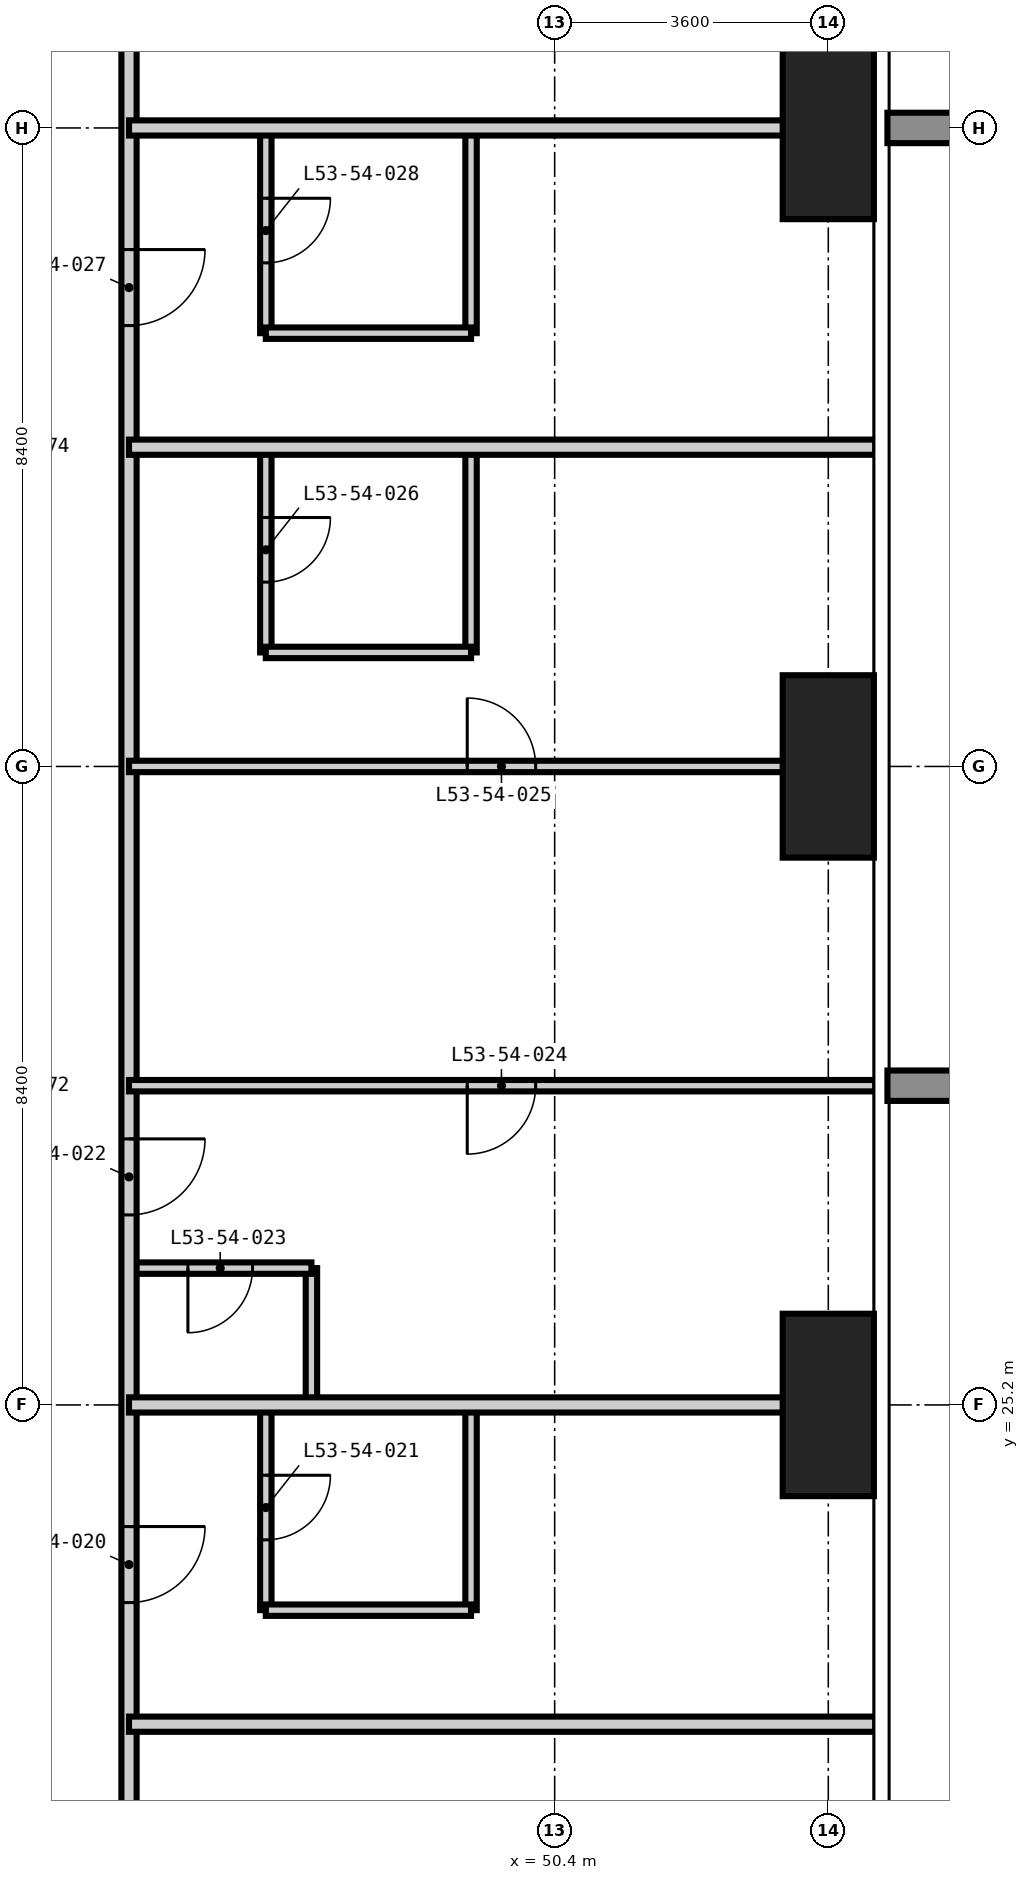
"""IFC4 building model, lengths in metres.
Left out: names, types, materials, properties, quantities, classifications, styles, units other than length and angle.
Written with IfcOpenShell. Run it as: python <this file> out.ifc"""

import sys

from ifc_helpers import new_model, si_unit, direction, frame, frame_2d, origin, origin_2d, place, context, subcontext, project, spatial, rectangle, extrude, element, fill, save


model = new_model("IFC4")
c1 = context("Model", 3, precision=1e-05, world=origin(), true_north=direction((0.0, 1.0)))
c2 = subcontext(c1, "Body", "Model", "MODEL_VIEW")
j1 = project(units=[si_unit("LENGTHUNIT", "METRE"), si_unit("PLANEANGLEUNIT", "RADIAN")], contexts=[c1])
p1 = place(None, origin())
s1 = spatial("IfcSite", under=j1, at=p1, CompositionType="ELEMENT")
p2 = place(p1, origin())
s2 = spatial("IfcBuilding", under=s1, at=p2, CompositionType="ELEMENT")
p3 = place(p2, frame((0.0, 0.0, 205.8)))
s3 = spatial("IfcBuildingStorey", under=s2, at=p3, CompositionType="ELEMENT", Elevation=205.8)
for number, where, z_axis, x_axis in (
    (1, (54.0, 25.2, -0.35), (0.0, 0.0, 1.0), (1.0, 0.0, 0.0)),
    (2, (54.0, 33.6, -0.35), (0.0, 0.0, 1.0), (1.0, 0.0, 0.0)),
    (3, (54.0, 42.0, -0.35), (0.0, 0.0, 1.0), (1.0, 0.0, 0.0)),
):
    element("IfcColumn", number, at=place(p3, frame(where, z_axis=z_axis, x_axis=x_axis)), inside=s3, PredefinedType="COLUMN", context=c2, shape_type="SweptSolid", body=[
        extrude(rectangle(XDim=1.2, YDim=2.4, at=origin_2d()), origin(), (0.0, 0.0, 1.0), 3.6),
    ])
p4 = place(p3, frame((46.6, 22.5, 0.0), z_axis=(0.0, 0.0, 1.0), x_axis=(0.0, 1.0, 0.0)))
e4 = element("IfcWall", 4, at=p4, inside=s3, PredefinedType="PARTITIONING", context=c2, shape_type="SweptSolid", body=[
    extrude(rectangle(XDim=2.7, YDim=0.15, at=frame_2d((1.35, 0.0))), origin(), (0.0, 0.0, 1.0), 3.25),
])
p5 = place(p4, frame((0.925, 0.0, 0.0)))
e5 = element("IfcOpeningElement", 5, at=p5, cuts=e4, PredefinedType="OPENING", context=c2, shape_type="SweptSolid", body=[
    extrude(rectangle(XDim=0.85, YDim=2.1, at=frame_2d((0.425, 1.05))), frame((0.0, 0.085, 0.0), z_axis=(0.0, -1.0, 0.0), x_axis=(1.0, 0.0, 0.0)), (0.0, 0.0, 1.0), 0.17),
])
p6 = place(p3, frame((46.6, 35.1, 0.0), z_axis=(0.0, 0.0, 1.0), x_axis=(0.0, 1.0, 0.0)))
e6 = element("IfcWall", 6, at=p6, inside=s3, PredefinedType="PARTITIONING", context=c2, shape_type="SweptSolid", body=[
    extrude(rectangle(XDim=2.7, YDim=0.15, at=frame_2d((1.35, 0.0))), origin(), (0.0, 0.0, 1.0), 3.25),
])
p7 = place(p6, frame((0.925, 0.0, 0.0)))
e7 = element("IfcOpeningElement", 7, at=p7, cuts=e6, PredefinedType="OPENING", context=c2, shape_type="SweptSolid", body=[
    extrude(rectangle(XDim=0.85, YDim=2.1, at=frame_2d((0.425, 1.05))), frame((0.0, 0.085, 0.0), z_axis=(0.0, -1.0, 0.0), x_axis=(1.0, 0.0, 0.0)), (0.0, 0.0, 1.0), 0.17),
])
p8 = place(p3, frame((46.6, 39.3, 0.0), z_axis=(0.0, 0.0, 1.0), x_axis=(0.0, 1.0, 0.0)))
e8 = element("IfcWall", 8, at=p8, inside=s3, PredefinedType="PARTITIONING", context=c2, shape_type="SweptSolid", body=[
    extrude(rectangle(XDim=2.7, YDim=0.15, at=frame_2d((1.35, 0.0))), origin(), (0.0, 0.0, 1.0), 3.25),
])
p9 = place(p8, frame((0.925, 0.0, 0.0)))
e9 = element("IfcOpeningElement", 9, at=p9, cuts=e8, PredefinedType="OPENING", context=c2, shape_type="SweptSolid", body=[
    extrude(rectangle(XDim=0.85, YDim=2.1, at=frame_2d((0.425, 1.05))), frame((0.0, 0.085, 0.0), z_axis=(0.0, -1.0, 0.0), x_axis=(1.0, 0.0, 0.0)), (0.0, 0.0, 1.0), 0.17),
])
p10 = place(p3, frame((47.2, 25.2, 0.0), z_axis=(0.0, 0.0, 1.0), x_axis=(0.0, 1.0, 0.0)))
e10 = element("IfcWall", 10, at=p10, inside=s3, PredefinedType="PARTITIONING", context=c2, shape_type="SweptSolid", body=[
    extrude(rectangle(XDim=1.8, YDim=0.15, at=frame_2d((0.9, 0.0))), origin(), (0.0, 0.0, 1.0), 3.25),
])
for number, where, z_axis, x_axis in (
    (11, (49.3, 22.5, 0.0), (0.0, 0.0, 1.0), (0.0, 1.0, 0.0)),
    (12, (49.3, 35.1, 0.0), (0.0, 0.0, 1.0), (0.0, 1.0, 0.0)),
    (13, (49.3, 39.3, 0.0), (0.0, 0.0, 1.0), (0.0, 1.0, 0.0)),
    (14, (46.6, 22.5, 0.0), (0.0, 0.0, 1.0), (1.0, 0.0, 0.0)),
):
    element("IfcWall", number, at=place(p3, frame(where, z_axis=z_axis, x_axis=x_axis)), inside=s3, PredefinedType="PARTITIONING", context=c2, shape_type="SweptSolid", body=[
        extrude(rectangle(XDim=2.7, YDim=0.15, at=frame_2d((1.35, 0.0))), origin(), (0.0, 0.0, 1.0), 3.25),
    ])
p11 = place(p3, frame((44.8, 27.0, 0.0), z_axis=(0.0, 0.0, 1.0), x_axis=(1.0, 0.0, 0.0)))
e15 = element("IfcWall", 15, at=p11, inside=s3, PredefinedType="PARTITIONING", context=c2, shape_type="SweptSolid", body=[
    extrude(rectangle(XDim=2.4, YDim=0.15, at=frame_2d((1.2, 0.0))), origin(), (0.0, 0.0, 1.0), 3.25),
])
p12 = place(p11, frame((0.775, 0.0, 0.0)))
e16 = element("IfcOpeningElement", 16, at=p12, cuts=e15, PredefinedType="OPENING", context=c2, shape_type="SweptSolid", body=[
    extrude(rectangle(XDim=0.85, YDim=2.1, at=frame_2d((0.425, 1.05))), frame((0.0, 0.085, 0.0), z_axis=(0.0, -1.0, 0.0), x_axis=(1.0, 0.0, 0.0)), (0.0, 0.0, 1.0), 0.17),
])
for number, where, z_axis, x_axis in (
    (17, (46.6, 35.1, 0.0), (0.0, 0.0, 1.0), (1.0, 0.0, 0.0)),
    (18, (46.6, 39.3, 0.0), (0.0, 0.0, 1.0), (1.0, 0.0, 0.0)),
):
    element("IfcWall", number, at=place(p3, frame(where, z_axis=z_axis, x_axis=x_axis)), inside=s3, PredefinedType="PARTITIONING", context=c2, shape_type="SweptSolid", body=[
        extrude(rectangle(XDim=2.7, YDim=0.15, at=frame_2d((1.35, 0.0))), origin(), (0.0, 0.0, 1.0), 3.25),
    ])
p13 = place(p3, frame((44.8, 45.4, 0.0), z_axis=(0.0, 0.0, 1.0), x_axis=(0.0, -1.0, 0.0)))
e19 = element("IfcWall", 19, at=p13, inside=s3, PredefinedType="PARTITIONING", context=c2, shape_type="SweptSolid", body=[
    extrude(rectangle(XDim=30.8, YDim=0.2, at=frame_2d((15.4, 0.0))), origin(), (0.0, 0.0, 1.0), 3.25),
])
p14 = place(p13, frame((26.0, 0.0, 0.0)))
e20 = element("IfcOpeningElement", 20, at=p14, cuts=e19, PredefinedType="OPENING", context=c2, shape_type="SweptSolid", body=[
    extrude(rectangle(XDim=1.0, YDim=2.2, at=frame_2d((0.5, 1.1))), frame((0.0, 0.11, 0.0), z_axis=(0.0, -1.0, 0.0), x_axis=(1.0, 0.0, 0.0)), (0.0, 0.0, 1.0), 0.22),
])
p15 = place(p13, frame((21.8, 0.0, 0.0)))
e21 = element("IfcOpeningElement", 21, at=p15, cuts=e19, PredefinedType="OPENING", context=c2, shape_type="SweptSolid", body=[
    extrude(rectangle(XDim=1.0, YDim=2.2, at=frame_2d((0.5, 1.1))), frame((0.0, 0.11, 0.0), z_axis=(0.0, -1.0, 0.0), x_axis=(1.0, 0.0, 0.0)), (0.0, 0.0, 1.0), 0.22),
])
p16 = place(p13, frame((16.7, 0.0, 0.0)))
e22 = element("IfcOpeningElement", 22, at=p16, cuts=e19, PredefinedType="OPENING", context=c2, shape_type="SweptSolid", body=[
    extrude(rectangle(XDim=1.0, YDim=2.2, at=frame_2d((0.5, 1.1))), frame((0.0, 0.11, 0.0), z_axis=(0.0, -1.0, 0.0), x_axis=(1.0, 0.0, 0.0)), (0.0, 0.0, 1.0), 0.22),
])
p17 = place(p13, frame((5.0, 0.0, 0.0)))
e23 = element("IfcOpeningElement", 23, at=p17, cuts=e19, PredefinedType="OPENING", context=c2, shape_type="SweptSolid", body=[
    extrude(rectangle(XDim=1.0, YDim=2.2, at=frame_2d((0.5, 1.1))), frame((0.0, 0.11, 0.0), z_axis=(0.0, -1.0, 0.0), x_axis=(1.0, 0.0, 0.0)), (0.0, 0.0, 1.0), 0.22),
])
p18 = place(p13, frame((29.2, 0.0, 0.0)))
e24 = element("IfcOpeningElement", 24, at=p18, cuts=e19, PredefinedType="OPENING", context=c2, shape_type="SweptSolid", body=[
    extrude(rectangle(XDim=1.0, YDim=2.2, at=frame_2d((0.5, 1.1))), frame((0.0, 0.11, 0.0), z_axis=(0.0, -1.0, 0.0), x_axis=(1.0, 0.0, 0.0)), (0.0, 0.0, 1.0), 0.22),
])
p19 = place(p13, frame((1.2, 0.0, 0.0)))
e25 = element("IfcOpeningElement", 25, at=p19, cuts=e19, PredefinedType="OPENING", context=c2, shape_type="SweptSolid", body=[
    extrude(rectangle(XDim=1.0, YDim=2.2, at=frame_2d((0.5, 1.1))), frame((0.0, 0.11, 0.0), z_axis=(0.0, -1.0, 0.0), x_axis=(1.0, 0.0, 0.0)), (0.0, 0.0, 1.0), 0.22),
])
for number, where, z_axis, x_axis in (
    (26, (44.8, 21.0, 0.0), (0.0, 0.0, 1.0), (1.0, 0.0, 0.0)),
    (27, (44.8, 25.2, 0.0), (0.0, 0.0, 1.0), (1.0, 0.0, 0.0)),
    (28, (44.8, 37.8, 0.0), (0.0, 0.0, 1.0), (1.0, 0.0, 0.0)),
    (29, (44.8, 42.0, 0.0), (0.0, 0.0, 1.0), (1.0, 0.0, 0.0)),
):
    element("IfcWall", number, at=place(p3, frame(where, z_axis=z_axis, x_axis=x_axis)), inside=s3, PredefinedType="PARTITIONING", context=c2, shape_type="SweptSolid", body=[
        extrude(rectangle(XDim=9.818, YDim=0.2, at=frame_2d((4.909, 0.0))), origin(), (0.0, 0.0, 1.0), 3.25),
    ])
p20 = place(p3, frame((44.8, 29.4, 0.0), z_axis=(0.0, 0.0, 1.0), x_axis=(1.0, 0.0, 0.0)))
e30 = element("IfcWall", 30, at=p20, inside=s3, PredefinedType="PARTITIONING", context=c2, shape_type="SweptSolid", body=[
    extrude(rectangle(XDim=9.818, YDim=0.15, at=frame_2d((4.909, 0.0))), origin(), (0.0, 0.0, 1.0), 3.25),
])
p21 = place(p20, frame((4.45, 0.0, 0.0)))
e31 = element("IfcOpeningElement", 31, at=p21, cuts=e30, PredefinedType="OPENING", context=c2, shape_type="SweptSolid", body=[
    extrude(rectangle(XDim=0.9, YDim=2.1, at=frame_2d((0.45, 1.05))), frame((0.0, 0.085, 0.0), z_axis=(0.0, -1.0, 0.0), x_axis=(1.0, 0.0, 0.0)), (0.0, 0.0, 1.0), 0.17),
])
p22 = place(p3, frame((44.8, 33.6, 0.0), z_axis=(0.0, 0.0, 1.0), x_axis=(1.0, 0.0, 0.0)))
e32 = element("IfcWall", 32, at=p22, inside=s3, PredefinedType="PARTITIONING", context=c2, shape_type="SweptSolid", body=[
    extrude(rectangle(XDim=9.818, YDim=0.15, at=frame_2d((4.909, 0.0))), origin(), (0.0, 0.0, 1.0), 3.25),
])
p23 = place(p22, frame((4.45, 0.0, 0.0)))
e33 = element("IfcOpeningElement", 33, at=p23, cuts=e32, PredefinedType="OPENING", context=c2, shape_type="SweptSolid", body=[
    extrude(rectangle(XDim=0.9, YDim=2.1, at=frame_2d((0.45, 1.05))), frame((0.0, 0.085, 0.0), z_axis=(0.0, -1.0, 0.0), x_axis=(1.0, 0.0, 0.0)), (0.0, 0.0, 1.0), 0.17),
])
p24 = place(p15, origin())
e34 = element("IfcDoor", 34, at=p24, inside=s3, OperationType="SINGLE_SWING_LEFT", PredefinedType="DOOR", context=c2, shape_type="SweptSolid", body=[
    extrude(rectangle(XDim=1.0, YDim=2.2, at=frame_2d((0.5, 1.1))), frame((0.0, 0.025, 0.0), z_axis=(0.0, -1.0, 0.0), x_axis=(1.0, 0.0, 0.0)), (0.0, 0.0, 1.0), 0.05),
])
fill(e21, e34)
p25 = place(p5, frame((0.85, 0.0, 0.0), z_axis=(0.0, 0.0, 1.0), x_axis=(-1.0, 0.0, 0.0)))
e35 = element("IfcDoor", 35, at=p25, inside=s3, OperationType="SINGLE_SWING_LEFT", PredefinedType="DOOR", context=c2, shape_type="SweptSolid", body=[
    extrude(rectangle(XDim=0.85, YDim=2.1, at=frame_2d((0.425, 1.05))), frame((0.0, 0.025, 0.0), z_axis=(0.0, -1.0, 0.0), x_axis=(1.0, 0.0, 0.0)), (0.0, 0.0, 1.0), 0.05),
])
fill(e5, e35)
p26 = place(p16, origin())
e36 = element("IfcDoor", 36, at=p26, inside=s3, OperationType="SINGLE_SWING_LEFT", PredefinedType="DOOR", context=c2, shape_type="SweptSolid", body=[
    extrude(rectangle(XDim=1.0, YDim=2.2, at=frame_2d((0.5, 1.1))), frame((0.0, 0.025, 0.0), z_axis=(0.0, -1.0, 0.0), x_axis=(1.0, 0.0, 0.0)), (0.0, 0.0, 1.0), 0.05),
])
fill(e22, e36)
p27 = place(p12, frame((0.85, 0.0, 0.0), z_axis=(0.0, 0.0, 1.0), x_axis=(-1.0, 0.0, 0.0)))
e37 = element("IfcDoor", 37, at=p27, inside=s3, OperationType="SINGLE_SWING_RIGHT", PredefinedType="DOOR", context=c2, shape_type="SweptSolid", body=[
    extrude(rectangle(XDim=0.85, YDim=2.1, at=frame_2d((0.425, 1.05))), frame((0.0, 0.025, 0.0), z_axis=(0.0, -1.0, 0.0), x_axis=(1.0, 0.0, 0.0)), (0.0, 0.0, 1.0), 0.05),
])
fill(e16, e37)
p28 = place(p21, frame((0.9, 0.0, 0.0), z_axis=(0.0, 0.0, 1.0), x_axis=(-1.0, 0.0, 0.0)))
e38 = element("IfcDoor", 38, at=p28, inside=s3, OperationType="SINGLE_SWING_RIGHT", PredefinedType="DOOR", context=c2, shape_type="SweptSolid", body=[
    extrude(rectangle(XDim=0.9, YDim=2.1, at=frame_2d((0.45, 1.05))), frame((0.0, 0.025, 0.0), z_axis=(0.0, -1.0, 0.0), x_axis=(1.0, 0.0, 0.0)), (0.0, 0.0, 1.0), 0.05),
])
fill(e31, e38)
p29 = place(p23, origin())
e39 = element("IfcDoor", 39, at=p29, inside=s3, OperationType="SINGLE_SWING_LEFT", PredefinedType="DOOR", context=c2, shape_type="SweptSolid", body=[
    extrude(rectangle(XDim=0.9, YDim=2.1, at=frame_2d((0.45, 1.05))), frame((0.0, 0.025, 0.0), z_axis=(0.0, -1.0, 0.0), x_axis=(1.0, 0.0, 0.0)), (0.0, 0.0, 1.0), 0.05),
])
fill(e33, e39)
p30 = place(p7, frame((0.85, 0.0, 0.0), z_axis=(0.0, 0.0, 1.0), x_axis=(-1.0, 0.0, 0.0)))
e40 = element("IfcDoor", 40, at=p30, inside=s3, OperationType="SINGLE_SWING_LEFT", PredefinedType="DOOR", context=c2, shape_type="SweptSolid", body=[
    extrude(rectangle(XDim=0.85, YDim=2.1, at=frame_2d((0.425, 1.05))), frame((0.0, 0.025, 0.0), z_axis=(0.0, -1.0, 0.0), x_axis=(1.0, 0.0, 0.0)), (0.0, 0.0, 1.0), 0.05),
])
fill(e7, e40)
p31 = place(p17, origin())
e41 = element("IfcDoor", 41, at=p31, inside=s3, OperationType="SINGLE_SWING_LEFT", PredefinedType="DOOR", context=c2, shape_type="SweptSolid", body=[
    extrude(rectangle(XDim=1.0, YDim=2.2, at=frame_2d((0.5, 1.1))), frame((0.0, 0.025, 0.0), z_axis=(0.0, -1.0, 0.0), x_axis=(1.0, 0.0, 0.0)), (0.0, 0.0, 1.0), 0.05),
])
fill(e23, e41)
p32 = place(p9, frame((0.85, 0.0, 0.0), z_axis=(0.0, 0.0, 1.0), x_axis=(-1.0, 0.0, 0.0)))
e42 = element("IfcDoor", 42, at=p32, inside=s3, OperationType="SINGLE_SWING_LEFT", PredefinedType="DOOR", context=c2, shape_type="SweptSolid", body=[
    extrude(rectangle(XDim=0.85, YDim=2.1, at=frame_2d((0.425, 1.05))), frame((0.0, 0.025, 0.0), z_axis=(0.0, -1.0, 0.0), x_axis=(1.0, 0.0, 0.0)), (0.0, 0.0, 1.0), 0.05),
])
fill(e9, e42)
save(model, sys.argv[1])
